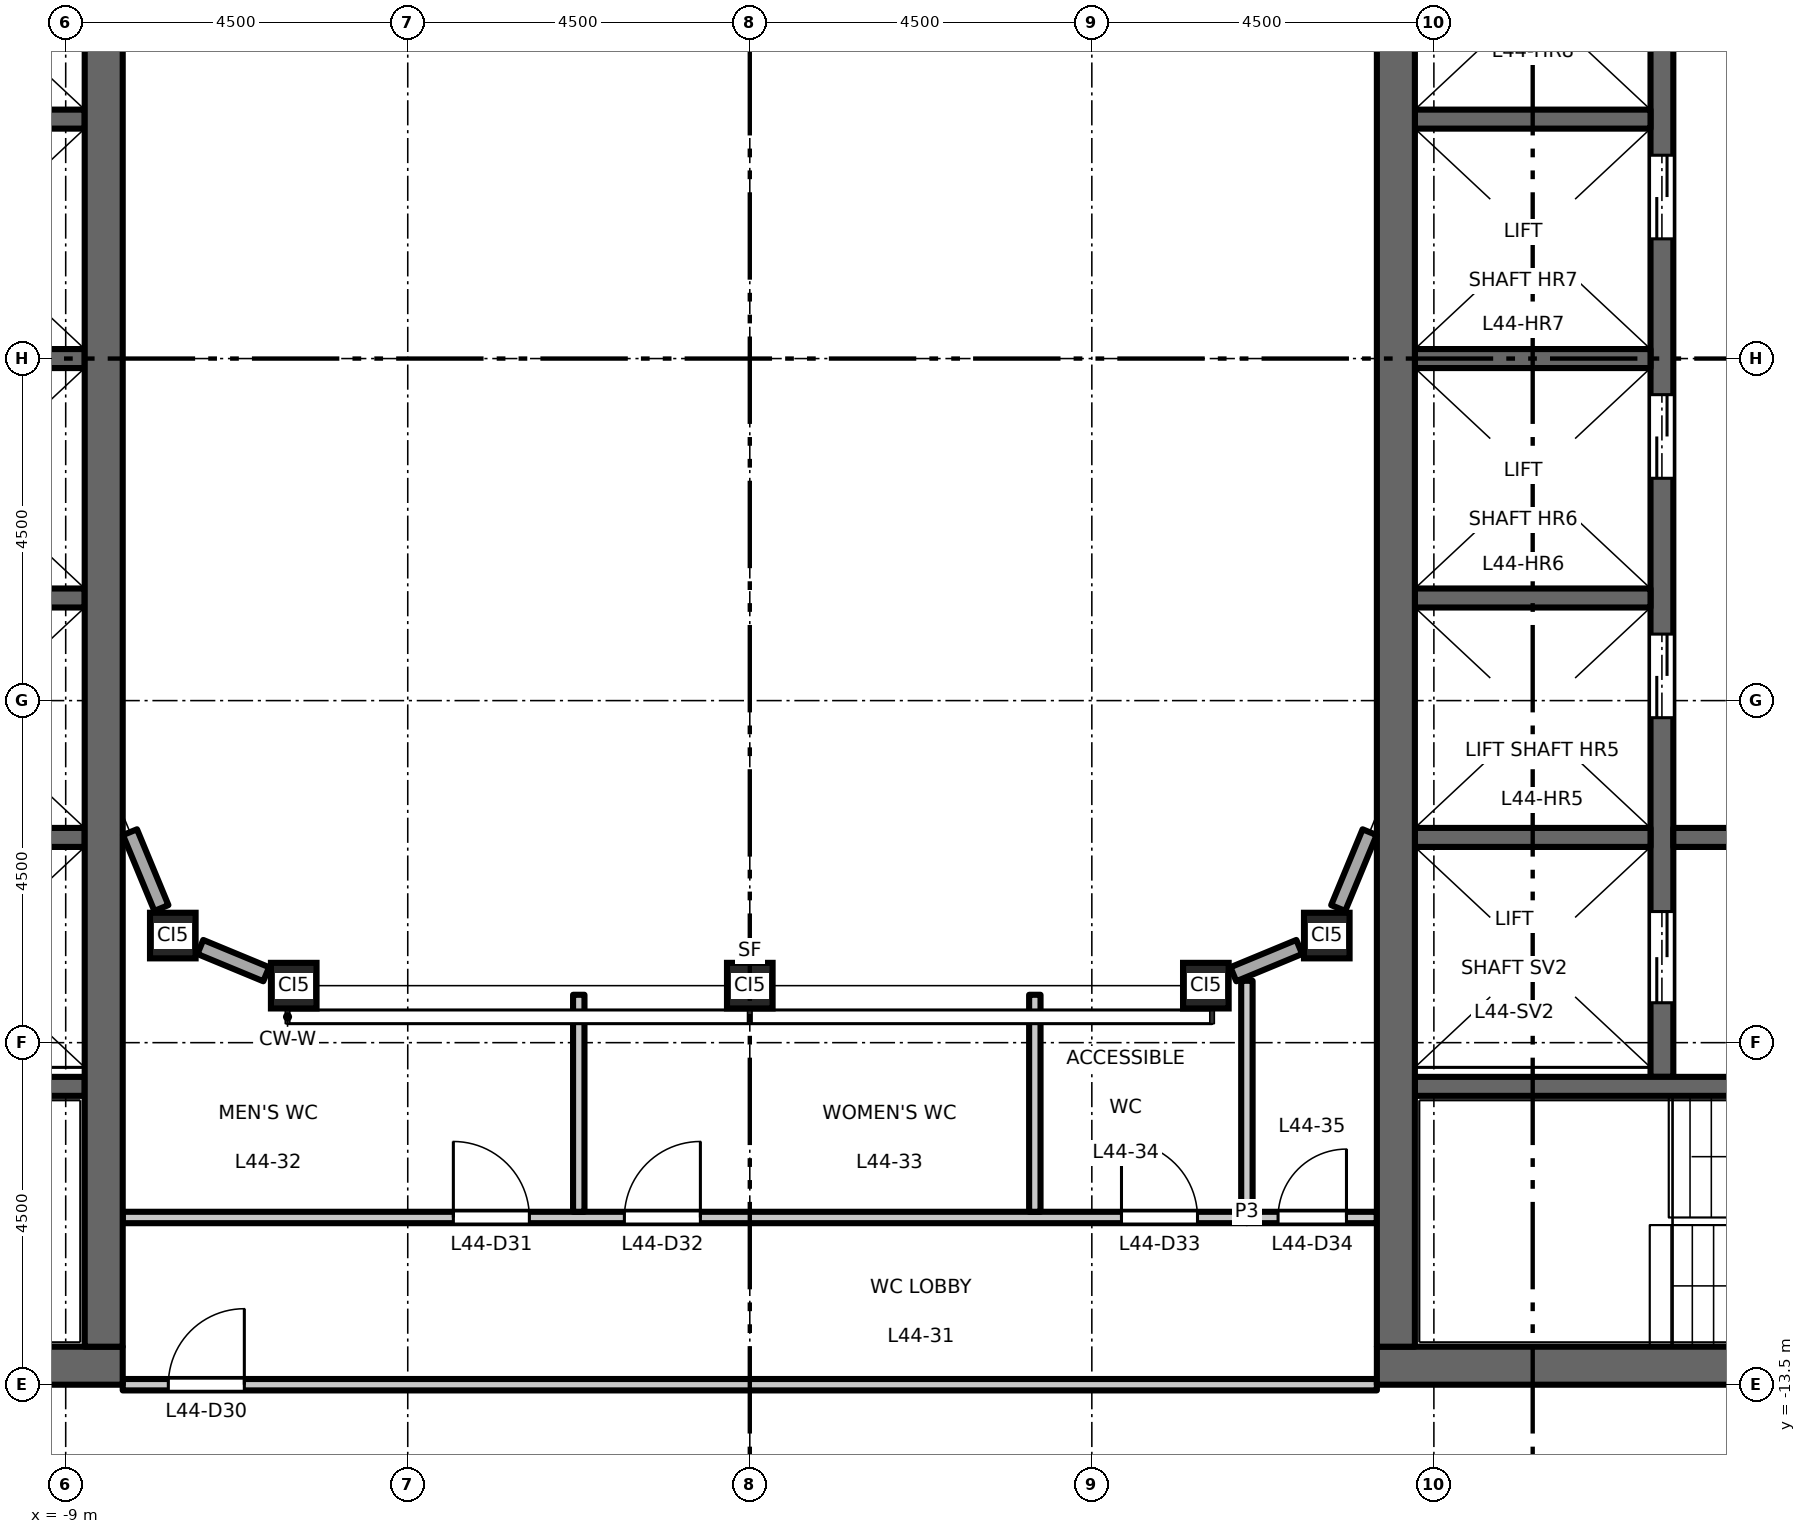
"""IFC4 building model, lengths in metres.
Left out: names, types, materials, properties, quantities, classifications, styles, units other than length and angle.
Written with IfcOpenShell. Run it as: python <this file> out.ifc"""

import sys

from ifc_helpers import new_model, si_unit, direction, frame, frame_2d, origin, origin_2d, place, context, subcontext, project, spatial, rectangle, hollow_rectangle, extrude, element, fill, save


model = new_model("IFC4")
c1 = context("Model", 3, precision=1e-05, world=origin(), true_north=direction((0.0, 1.0)))
c2 = subcontext(c1, "Body", "Model", "MODEL_VIEW")
j1 = project(units=[si_unit("LENGTHUNIT", "METRE"), si_unit("PLANEANGLEUNIT", "RADIAN")], contexts=[c1])
p1 = place(None, origin())
s1 = spatial("IfcSite", under=j1, at=p1, CompositionType="ELEMENT")
p2 = place(p1, origin())
s2 = spatial("IfcBuilding", under=s1, at=p2, CompositionType="ELEMENT")
p3 = place(p2, frame((0.0, 0.0, 206.2)))
s3 = spatial("IfcBuildingStorey", under=s2, at=p3, CompositionType="ELEMENT", Elevation=206.2)
for number, where, z_axis, x_axis in (
    (1, (-7.591, -7.591, 0.0), (0.0, 0.0, 1.0), (1.0, 0.0, 0.0)),
    (2, (-6.0, -8.25, 0.0), (0.0, 0.0, 1.0), (1.0, 0.0, 0.0)),
    (3, (0.0, -8.25, 0.0), (0.0, 0.0, 1.0), (1.0, 0.0, 0.0)),
    (4, (6.0, -8.25, 0.0), (0.0, 0.0, 1.0), (1.0, 0.0, 0.0)),
    (5, (7.591, -7.591, 0.0), (0.0, 0.0, 1.0), (1.0, 0.0, 0.0)),
):
    element("IfcColumn", number, at=place(p3, frame(where, z_axis=z_axis, x_axis=x_axis)), inside=s3, PredefinedType="COLUMN", context=c2, shape_type="SweptSolid", body=[
        extrude(hollow_rectangle(XDim=0.6, YDim=0.6, WallThickness=0.032, at=origin_2d()), origin(), (0.0, 0.0, 1.0), 4.5),
    ])
for number, where, z_axis, x_axis in (
    (6, (-8.75, 0.0, 0.0), (0.0, 0.0, 1.0), (-1.0, 0.0, 0.0)),
    (7, (-8.75, 3.15, 0.0), (0.0, 0.0, 1.0), (-1.0, 0.0, 0.0)),
    (8, (-8.75, -3.15, 0.0), (0.0, 0.0, 1.0), (-1.0, 0.0, 0.0)),
    (9, (-8.75, -6.3, 0.0), (0.0, 0.0, 1.0), (-1.0, 0.0, 0.0)),
):
    element("IfcWall", number, at=place(p3, frame(where, z_axis=z_axis, x_axis=x_axis)), inside=s3, PredefinedType="SHEAR", context=c2, shape_type="SweptSolid", body=[
        extrude(rectangle(XDim=3.1, YDim=0.25, at=frame_2d((1.55, 0.0))), origin(), (0.0, 0.0, 1.0), 4.35),
    ])
p4 = place(p3, frame((-8.75, -9.575, 0.0), z_axis=(0.0, 0.0, 1.0), x_axis=(-1.0, 0.0, 0.0)))
e10 = element("IfcWall", 10, at=p4, inside=s3, PredefinedType="SHEAR", context=c2, shape_type="SweptSolid", body=[
    extrude(rectangle(XDim=8.0, YDim=0.25, at=frame_2d((4.0, 0.0))), origin(), (0.0, 0.0, 1.0), 4.35),
])
p5 = place(p4, frame((6.65, 0.0, 0.0)))
e11 = element("IfcOpeningElement", 11, at=p5, cuts=e10, PredefinedType="OPENING", context=c2, shape_type="SweptSolid", body=[
    extrude(rectangle(XDim=1.1, YDim=2.1, at=frame_2d((0.55, 1.05))), frame((0.0, 0.135, 0.0), z_axis=(0.0, -1.0, 0.0), x_axis=(1.0, 0.0, 0.0)), (0.0, 0.0, 1.0), 0.27),
])
p6 = place(p3, frame((-8.25, -13.25, 0.0), z_axis=(0.0, 0.0, 1.0), x_axis=(-1.0, 0.0, 0.0)))
e12 = element("IfcWall", 12, at=p6, inside=s3, PredefinedType="SHEAR", context=c2, shape_type="SweptSolid", body=[
    extrude(rectangle(XDim=13.5, YDim=0.5, at=frame_2d((6.75, 0.0))), origin(), (0.0, 0.0, 1.0), 4.35),
])
p7 = place(p3, frame((-8.5, -13.0, 0.0), z_axis=(0.0, 0.0, 1.0), x_axis=(0.0, 1.0, 0.0)))
e13 = element("IfcWall", 13, at=p7, inside=s3, PredefinedType="SHEAR", context=c2, shape_type="SweptSolid", body=[
    extrude(rectangle(XDim=26.0, YDim=0.5, at=frame_2d((13.0, 0.0))), origin(), (0.0, 0.0, 1.0), 4.35),
])
p8 = place(p3, frame((12.0, -9.45, 0.0), z_axis=(0.0, 0.0, 1.0), x_axis=(0.0, 1.0, 0.0)))
e14 = element("IfcWall", 14, at=p8, inside=s3, PredefinedType="SHEAR", context=c2, shape_type="SweptSolid", body=[
    extrude(rectangle(XDim=18.9, YDim=0.3, at=frame_2d((9.45, 0.0))), origin(), (0.0, 0.0, 1.0), 4.35),
])
p9 = place(p8, frame((4.725, 0.0, 0.0)))
e15 = element("IfcOpeningElement", 15, at=p9, cuts=e14, PredefinedType="OPENING", context=c2, shape_type="SweptSolid", body=[
    extrude(rectangle(XDim=1.1, YDim=2.1, at=frame_2d((0.55, 1.05))), frame((0.0, 0.16, 0.0), z_axis=(0.0, -1.0, 0.0), x_axis=(1.0, 0.0, 0.0)), (0.0, 0.0, 1.0), 0.32),
])
p10 = place(p8, frame((7.875, 0.0, 0.0)))
e16 = element("IfcOpeningElement", 16, at=p10, cuts=e14, PredefinedType="OPENING", context=c2, shape_type="SweptSolid", body=[
    extrude(rectangle(XDim=1.1, YDim=2.1, at=frame_2d((0.55, 1.05))), frame((0.0, 0.16, 0.0), z_axis=(0.0, -1.0, 0.0), x_axis=(1.0, 0.0, 0.0)), (0.0, 0.0, 1.0), 0.32),
])
p11 = place(p8, frame((11.025, 0.0, 0.0)))
e17 = element("IfcOpeningElement", 17, at=p11, cuts=e14, PredefinedType="OPENING", context=c2, shape_type="SweptSolid", body=[
    extrude(rectangle(XDim=1.1, YDim=2.1, at=frame_2d((0.55, 1.05))), frame((0.0, 0.16, 0.0), z_axis=(0.0, -1.0, 0.0), x_axis=(1.0, 0.0, 0.0)), (0.0, 0.0, 1.0), 0.32),
])
p12 = place(p8, frame((14.175, 0.0, 0.0)))
e18 = element("IfcOpeningElement", 18, at=p12, cuts=e14, PredefinedType="OPENING", context=c2, shape_type="SweptSolid", body=[
    extrude(rectangle(XDim=1.1, YDim=2.1, at=frame_2d((0.55, 1.05))), frame((0.0, 0.16, 0.0), z_axis=(0.0, -1.0, 0.0), x_axis=(1.0, 0.0, 0.0)), (0.0, 0.0, 1.0), 0.32),
])
p13 = place(p8, frame((16.725, 0.0, 0.0)))
e19 = element("IfcOpeningElement", 19, at=p13, cuts=e14, PredefinedType="OPENING", context=c2, shape_type="SweptSolid", body=[
    extrude(rectangle(XDim=1.2, YDim=2.1, at=frame_2d((0.6, 1.05))), frame((0.0, 0.16, 0.0), z_axis=(0.0, -1.0, 0.0), x_axis=(1.0, 0.0, 0.0)), (0.0, 0.0, 1.0), 0.32),
])
p14 = place(p8, frame((0.975, 0.0, 0.0)))
e20 = element("IfcOpeningElement", 20, at=p14, cuts=e14, PredefinedType="OPENING", context=c2, shape_type="SweptSolid", body=[
    extrude(rectangle(XDim=1.2, YDim=2.1, at=frame_2d((0.6, 1.05))), frame((0.0, 0.16, 0.0), z_axis=(0.0, -1.0, 0.0), x_axis=(1.0, 0.0, 0.0)), (0.0, 0.0, 1.0), 0.32),
])
p15 = place(p3, frame((12.15, -6.3, 0.0), z_axis=(0.0, 0.0, 1.0), x_axis=(1.0, 0.0, 0.0)))
e21 = element("IfcWall", 21, at=p15, inside=s3, PredefinedType="SHEAR", context=c2, shape_type="SweptSolid", body=[
    extrude(rectangle(XDim=9.1, YDim=0.25, at=frame_2d((4.55, 0.0))), origin(), (0.0, 0.0, 1.0), 4.35),
])
p16 = place(p15, frame((1.8, 0.0, 0.0)))
e22 = element("IfcOpeningElement", 22, at=p16, cuts=e21, PredefinedType="OPENING", context=c2, shape_type="SweptSolid", body=[
    extrude(rectangle(XDim=1.0, YDim=2.1, at=frame_2d((0.5, 1.05))), frame((0.0, 0.135, 0.0), z_axis=(0.0, -1.0, 0.0), x_axis=(1.0, 0.0, 0.0)), (0.0, 0.0, 1.0), 0.27),
])
for number, where, z_axis, x_axis in (
    (23, (8.75, 0.0, 0.0), (0.0, 0.0, 1.0), (1.0, 0.0, 0.0)),
    (24, (8.75, 3.15, 0.0), (0.0, 0.0, 1.0), (1.0, 0.0, 0.0)),
    (25, (8.75, -3.15, 0.0), (0.0, 0.0, 1.0), (1.0, 0.0, 0.0)),
    (26, (8.75, -6.3, 0.0), (0.0, 0.0, 1.0), (1.0, 0.0, 0.0)),
):
    element("IfcWall", number, at=place(p3, frame(where, z_axis=z_axis, x_axis=x_axis)), inside=s3, PredefinedType="SHEAR", context=c2, shape_type="SweptSolid", body=[
        extrude(rectangle(XDim=3.1, YDim=0.25, at=frame_2d((1.55, 0.0))), origin(), (0.0, 0.0, 1.0), 4.35),
    ])
p17 = place(p3, frame((8.75, -9.575, 0.0), z_axis=(0.0, 0.0, 1.0), x_axis=(1.0, 0.0, 0.0)))
e27 = element("IfcWall", 27, at=p17, inside=s3, PredefinedType="SHEAR", context=c2, shape_type="SweptSolid", body=[
    extrude(rectangle(XDim=8.0, YDim=0.25, at=frame_2d((4.0, 0.0))), origin(), (0.0, 0.0, 1.0), 4.35),
])
p18 = place(p17, frame((6.65, 0.0, 0.0)))
e28 = element("IfcOpeningElement", 28, at=p18, cuts=e27, PredefinedType="OPENING", context=c2, shape_type="SweptSolid", body=[
    extrude(rectangle(XDim=1.1, YDim=2.1, at=frame_2d((0.55, 1.05))), frame((0.0, 0.135, 0.0), z_axis=(0.0, -1.0, 0.0), x_axis=(1.0, 0.0, 0.0)), (0.0, 0.0, 1.0), 0.27),
])
p19 = place(p3, frame((8.25, -13.25, 0.0), z_axis=(0.0, 0.0, 1.0), x_axis=(1.0, 0.0, 0.0)))
e29 = element("IfcWall", 29, at=p19, inside=s3, PredefinedType="SHEAR", context=c2, shape_type="SweptSolid", body=[
    extrude(rectangle(XDim=13.5, YDim=0.5, at=frame_2d((6.75, 0.0))), origin(), (0.0, 0.0, 1.0), 4.35),
])
p20 = place(p3, frame((8.5, -13.0, 0.0), z_axis=(0.0, 0.0, 1.0), x_axis=(0.0, 1.0, 0.0)))
e30 = element("IfcWall", 30, at=p20, inside=s3, PredefinedType="SHEAR", context=c2, shape_type="SweptSolid", body=[
    extrude(rectangle(XDim=26.0, YDim=0.5, at=frame_2d((13.0, 0.0))), origin(), (0.0, 0.0, 1.0), 4.35),
])
p21 = place(p3, frame((6.362, -8.1, 0.0), z_axis=(0.0, 0.0, 1.0), x_axis=(0.923829670615, 0.382803787458, 0.0)))
e31 = element("IfcWall", 31, at=p21, inside=s3, PredefinedType="STANDARD", context=c2, shape_type="SweptSolid", body=[
    extrude(rectangle(XDim=0.938, YDim=0.2, at=frame_2d((0.469, 0.0))), origin(), (0.0, 0.0, 1.0), 3.918),
])
for number, where, z_axis, x_axis in (
    (32, (7.741, -7.229, 0.0), (0.0, 0.0, 1.0), (0.383, 0.924, 0.0)),
    (33, (-8.154, -6.231, 0.0), (0.0, 0.0, 1.0), (0.383, -0.924, 0.0)),
):
    element("IfcWall", number, at=place(p3, frame(where, z_axis=z_axis, x_axis=x_axis)), inside=s3, PredefinedType="STANDARD", context=c2, shape_type="SweptSolid", body=[
        extrude(rectangle(XDim=1.08, YDim=0.2, at=frame_2d((0.54, 0.0))), origin(), (0.0, 0.0, 1.0), 3.918),
    ])
p22 = place(p3, frame((-7.229, -7.741, 0.0), z_axis=(0.0, 0.0, 1.0), x_axis=(0.923829670615, -0.382803787458, 0.0)))
e34 = element("IfcWall", 34, at=p22, inside=s3, PredefinedType="STANDARD", context=c2, shape_type="SweptSolid", body=[
    extrude(rectangle(XDim=0.938, YDim=0.2, at=frame_2d((0.469, 0.0))), origin(), (0.0, 0.0, 1.0), 3.918),
])
p23 = place(p3, frame((-8.25, -13.5, 0.0), z_axis=(0.0, 0.0, 1.0), x_axis=(1.0, 0.0, 0.0)))
e35 = element("IfcWall", 35, at=p23, inside=s3, PredefinedType="PARTITIONING", context=c2, shape_type="SweptSolid", body=[
    extrude(rectangle(XDim=16.5, YDim=0.15, at=frame_2d((8.25, 0.0))), origin(), (0.0, 0.0, 1.0), 3.95),
])
p24 = place(p23, frame((0.6, 0.0, 0.0)))
e36 = element("IfcOpeningElement", 36, at=p24, cuts=e35, PredefinedType="OPENING", context=c2, shape_type="SweptSolid", body=[
    extrude(rectangle(XDim=1.0, YDim=2.1, at=frame_2d((0.5, 1.05))), frame((0.0, 0.085, 0.0), z_axis=(0.0, -1.0, 0.0), x_axis=(1.0, 0.0, 0.0)), (0.0, 0.0, 1.0), 0.17),
])
p25 = place(p3, frame((-8.25, -11.3, 0.0), z_axis=(0.0, 0.0, 1.0), x_axis=(1.0, 0.0, 0.0)))
e37 = element("IfcWall", 37, at=p25, inside=s3, PredefinedType="PARTITIONING", context=c2, shape_type="SweptSolid", body=[
    extrude(rectangle(XDim=14.79, YDim=0.15, at=frame_2d((7.395, 0.0))), origin(), (0.0, 0.0, 1.0), 4.35),
])
p26 = place(p25, frame((4.35, 0.0, 0.0)))
e38 = element("IfcOpeningElement", 38, at=p26, cuts=e37, PredefinedType="OPENING", context=c2, shape_type="SweptSolid", body=[
    extrude(rectangle(XDim=1.0, YDim=2.1, at=frame_2d((0.5, 1.05))), frame((0.0, 0.085, 0.0), z_axis=(0.0, -1.0, 0.0), x_axis=(1.0, 0.0, 0.0)), (0.0, 0.0, 1.0), 0.17),
])
p27 = place(p25, frame((6.6, 0.0, 0.0)))
e39 = element("IfcOpeningElement", 39, at=p27, cuts=e37, PredefinedType="OPENING", context=c2, shape_type="SweptSolid", body=[
    extrude(rectangle(XDim=1.0, YDim=2.1, at=frame_2d((0.5, 1.05))), frame((0.0, 0.085, 0.0), z_axis=(0.0, -1.0, 0.0), x_axis=(1.0, 0.0, 0.0)), (0.0, 0.0, 1.0), 0.17),
])
p28 = place(p25, frame((13.14, 0.0, 0.0)))
e40 = element("IfcOpeningElement", 40, at=p28, cuts=e37, PredefinedType="OPENING", context=c2, shape_type="SweptSolid", body=[
    extrude(rectangle(XDim=1.0, YDim=2.1, at=frame_2d((0.5, 1.05))), frame((0.0, 0.085, 0.0), z_axis=(0.0, -1.0, 0.0), x_axis=(1.0, 0.0, 0.0)), (0.0, 0.0, 1.0), 0.17),
])
p29 = place(p3, frame((6.54, -11.3, 0.0), z_axis=(0.0, 0.0, 1.0), x_axis=(1.0, 0.0, 0.0)))
e41 = element("IfcWall", 41, at=p29, inside=s3, PredefinedType="PARTITIONING", context=c2, shape_type="SweptSolid", body=[
    extrude(rectangle(XDim=1.71, YDim=0.15, at=frame_2d((0.855, 0.0))), origin(), (0.0, 0.0, 1.0), 4.35),
])
p30 = place(p29, frame((0.41, 0.0, 0.0)))
e42 = element("IfcOpeningElement", 42, at=p30, cuts=e41, PredefinedType="OPENING", context=c2, shape_type="SweptSolid", body=[
    extrude(rectangle(XDim=0.9, YDim=2.1, at=frame_2d((0.45, 1.05))), frame((0.0, 0.085, 0.0), z_axis=(0.0, -1.0, 0.0), x_axis=(1.0, 0.0, 0.0)), (0.0, 0.0, 1.0), 0.17),
])
for number, where, z_axis, x_axis in (
    (43, (-2.25, -11.225, 0.0), (0.0, 0.0, 1.0), (0.0, 1.0, 0.0)),
    (44, (3.75, -11.225, 0.0), (0.0, 0.0, 1.0), (0.0, 1.0, 0.0)),
):
    element("IfcWall", number, at=place(p3, frame(where, z_axis=z_axis, x_axis=x_axis)), inside=s3, PredefinedType="PARTITIONING", context=c2, shape_type="SweptSolid", body=[
        extrude(rectangle(XDim=2.855, YDim=0.15, at=frame_2d((1.427, 0.0))), origin(), (0.0, 0.0, 1.0), 4.35),
    ])
p31 = place(p3, frame((6.54, -11.225, 0.0), z_axis=(0.0, 0.0, 1.0), x_axis=(0.0, 1.0, 0.0)))
e45 = element("IfcWall", 45, at=p31, inside=s3, PredefinedType="PARTITIONING", context=c2, shape_type="SweptSolid", body=[
    extrude(rectangle(XDim=3.039, YDim=0.15, at=frame_2d((1.52, 0.0))), origin(), (0.0, 0.0, 1.0), 4.35),
])
p32 = place(p9, origin())
e46 = element("IfcDoor", 46, at=p32, inside=s3, OperationType="DOUBLE_DOOR_SLIDING", PredefinedType="DOOR", context=c2, shape_type="SweptSolid", body=[
    extrude(rectangle(XDim=1.1, YDim=2.1, at=frame_2d((0.55, 1.05))), frame((0.0, 0.025, 0.0), z_axis=(0.0, -1.0, 0.0), x_axis=(1.0, 0.0, 0.0)), (0.0, 0.0, 1.0), 0.05),
])
fill(e15, e46)
p33 = place(p10, origin())
e47 = element("IfcDoor", 47, at=p33, inside=s3, OperationType="DOUBLE_DOOR_SLIDING", PredefinedType="DOOR", context=c2, shape_type="SweptSolid", body=[
    extrude(rectangle(XDim=1.1, YDim=2.1, at=frame_2d((0.55, 1.05))), frame((0.0, 0.025, 0.0), z_axis=(0.0, -1.0, 0.0), x_axis=(1.0, 0.0, 0.0)), (0.0, 0.0, 1.0), 0.05),
])
fill(e16, e47)
p34 = place(p11, origin())
e48 = element("IfcDoor", 48, at=p34, inside=s3, OperationType="DOUBLE_DOOR_SLIDING", PredefinedType="DOOR", context=c2, shape_type="SweptSolid", body=[
    extrude(rectangle(XDim=1.1, YDim=2.1, at=frame_2d((0.55, 1.05))), frame((0.0, 0.025, 0.0), z_axis=(0.0, -1.0, 0.0), x_axis=(1.0, 0.0, 0.0)), (0.0, 0.0, 1.0), 0.05),
])
fill(e17, e48)
p35 = place(p14, origin())
e49 = element("IfcDoor", 49, at=p35, inside=s3, OperationType="DOUBLE_DOOR_SLIDING", PredefinedType="DOOR", context=c2, shape_type="SweptSolid", body=[
    extrude(rectangle(XDim=1.2, YDim=2.1, at=frame_2d((0.6, 1.05))), frame((0.0, 0.025, 0.0), z_axis=(0.0, -1.0, 0.0), x_axis=(1.0, 0.0, 0.0)), (0.0, 0.0, 1.0), 0.05),
])
fill(e20, e49)
p36 = place(p24, origin())
e50 = element("IfcDoor", 50, at=p36, inside=s3, OperationType="SINGLE_SWING_RIGHT", PredefinedType="DOOR", context=c2, shape_type="SweptSolid", body=[
    extrude(rectangle(XDim=1.0, YDim=2.1, at=frame_2d((0.5, 1.05))), frame((0.0, 0.025, 0.0), z_axis=(0.0, -1.0, 0.0), x_axis=(1.0, 0.0, 0.0)), (0.0, 0.0, 1.0), 0.05),
])
fill(e36, e50)
p37 = place(p26, origin())
e51 = element("IfcDoor", 51, at=p37, inside=s3, OperationType="SINGLE_SWING_LEFT", PredefinedType="DOOR", context=c2, shape_type="SweptSolid", body=[
    extrude(rectangle(XDim=1.0, YDim=2.1, at=frame_2d((0.5, 1.05))), frame((0.0, 0.025, 0.0), z_axis=(0.0, -1.0, 0.0), x_axis=(1.0, 0.0, 0.0)), (0.0, 0.0, 1.0), 0.05),
])
fill(e38, e51)
p38 = place(p27, origin())
e52 = element("IfcDoor", 52, at=p38, inside=s3, OperationType="SINGLE_SWING_RIGHT", PredefinedType="DOOR", context=c2, shape_type="SweptSolid", body=[
    extrude(rectangle(XDim=1.0, YDim=2.1, at=frame_2d((0.5, 1.05))), frame((0.0, 0.025, 0.0), z_axis=(0.0, -1.0, 0.0), x_axis=(1.0, 0.0, 0.0)), (0.0, 0.0, 1.0), 0.05),
])
fill(e39, e52)
p39 = place(p28, origin())
e53 = element("IfcDoor", 53, at=p39, inside=s3, OperationType="SINGLE_SWING_LEFT", PredefinedType="DOOR", context=c2, shape_type="SweptSolid", body=[
    extrude(rectangle(XDim=1.0, YDim=2.1, at=frame_2d((0.5, 1.05))), frame((0.0, 0.025, 0.0), z_axis=(0.0, -1.0, 0.0), x_axis=(1.0, 0.0, 0.0)), (0.0, 0.0, 1.0), 0.05),
])
fill(e40, e53)
p40 = place(p30, origin())
e54 = element("IfcDoor", 54, at=p40, inside=s3, OperationType="SINGLE_SWING_RIGHT", PredefinedType="DOOR", context=c2, shape_type="SweptSolid", body=[
    extrude(rectangle(XDim=0.9, YDim=2.1, at=frame_2d((0.45, 1.05))), frame((0.0, 0.025, 0.0), z_axis=(0.0, -1.0, 0.0), x_axis=(1.0, 0.0, 0.0)), (0.0, 0.0, 1.0), 0.05),
])
fill(e42, e54)
save(model, sys.argv[1])
